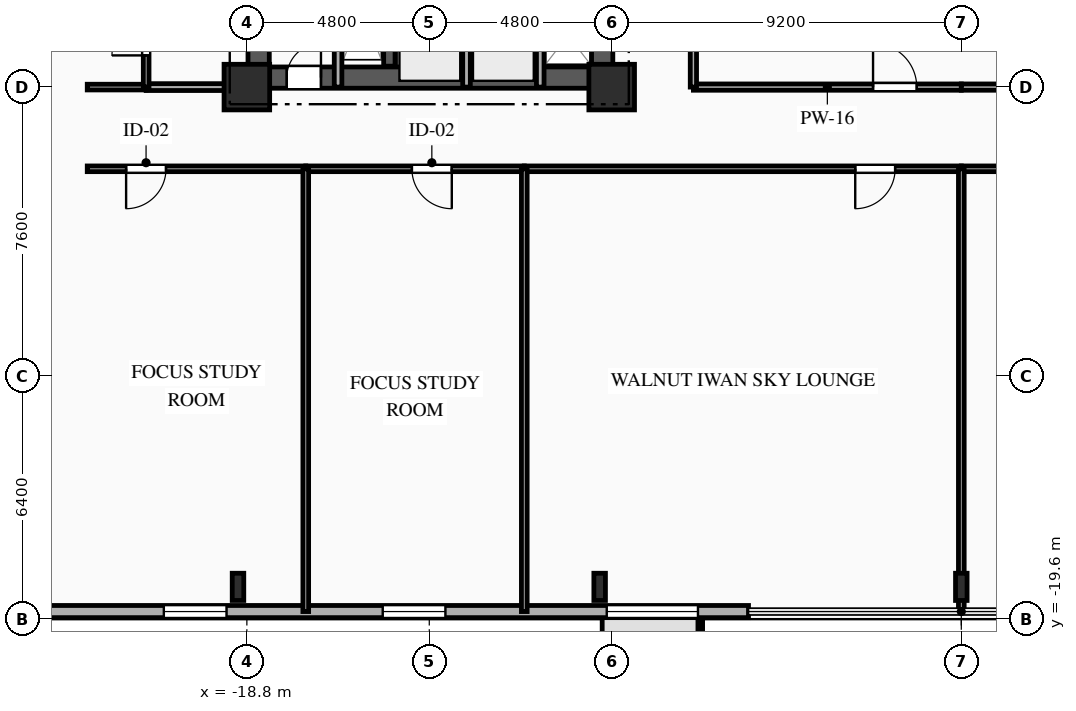
"""IFC4 building model, lengths in metres.
Left out: names, types, materials, properties, quantities, classifications, styles, units other than length and angle.
Written with IfcOpenShell. Run it as: python <this file> out.ifc"""

import sys

from ifc_helpers import new_model, si_unit, direction, frame, frame_2d, origin, origin_2d, place, context, subcontext, project, spatial, rectangle, i_section, extrude, element, fill, save


model = new_model("IFC4")
c1 = context("Model", 3, precision=1e-05, world=origin(), true_north=direction((0.0, 1.0)))
c2 = subcontext(c1, "Body", "Model", "MODEL_VIEW")
j1 = project(units=[si_unit("LENGTHUNIT", "METRE"), si_unit("PLANEANGLEUNIT", "RADIAN")], contexts=[c1])
p1 = place(None, origin())
s1 = spatial("IfcSite", under=j1, at=p1, CompositionType="ELEMENT")
p2 = place(p1, origin())
s2 = spatial("IfcBuilding", under=s1, at=p2, CompositionType="ELEMENT")
p3 = place(p2, frame((0.0, 0.0, 50.45)))
s3 = spatial("IfcBuildingStorey", under=s2, at=p3, CompositionType="ELEMENT", Elevation=50.45)
for number, where, z_axis, x_axis in (
    (1, (-18.8, -5.6, 0.0), (0.0, 0.0, 1.0), (1.0, 0.0, 0.0)),
    (2, (-9.2, -5.6, 0.0), (0.0, 0.0, 1.0), (1.0, 0.0, 0.0)),
):
    element("IfcColumn", number, at=place(p3, frame(where, z_axis=z_axis, x_axis=x_axis)), inside=s3, PredefinedType="COLUMN", context=c2, shape_type="SweptSolid", body=[
        extrude(rectangle(XDim=1.2, YDim=1.2, at=origin_2d()), origin(), (0.0, 0.0, 1.0), 3.35),
    ])
for number, where, z_axis, x_axis in (
    (3, (-19.033, -18.75, 0.0), (0.0, 0.0, 1.0), (1.0, 0.0, 0.0)),
    (4, (-9.517, -18.75, 0.0), (0.0, 0.0, 1.0), (1.0, 0.0, 0.0)),
    (5, (0.0, -18.75, 0.0), (0.0, 0.0, 1.0), (1.0, 0.0, 0.0)),
):
    element("IfcColumn", number, at=place(p3, frame(where, z_axis=z_axis, x_axis=x_axis)), inside=s3, PredefinedType="COLUMN", context=c2, shape_type="SweptSolid", body=[
        extrude(i_section(OverallWidth=0.304, OverallDepth=0.716, WebThickness=0.021, FlangeThickness=0.04, FilletRadius=0.027, at=origin_2d()), origin(), (0.0, 0.0, 1.0), 3.35),
    ])
p4 = place(p3, frame((-5.6, -19.4, 0.0), z_axis=(0.0, 0.0, 1.0), x_axis=(-1.0, 0.0, 0.0)))
e6 = element("IfcWall", 6, at=p4, inside=s3, PredefinedType="SOLIDWALL", context=c2, shape_type="SweptSolid", body=[
    extrude(rectangle(XDim=23.6, YDim=0.32, at=frame_2d((11.8, 0.0))), origin(), (0.0, 0.0, 1.0), 3.035),
])
p5 = place(p4, frame((1.33, 0.0, 0.85)))
e7 = element("IfcOpeningElement", 7, at=p5, cuts=e6, PredefinedType="OPENING", context=c2, shape_type="SweptSolid", body=[
    extrude(rectangle(XDim=2.4, YDim=1.95, at=frame_2d((1.2, 0.975))), frame((0.0, 0.17, 0.0), z_axis=(0.0, -1.0, 0.0), x_axis=(1.0, 0.0, 0.0)), (0.0, 0.0, 1.0), 0.34),
])
p6 = place(p4, frame((7.975, 0.0, 0.85)))
e8 = element("IfcOpeningElement", 8, at=p6, cuts=e6, PredefinedType="OPENING", context=c2, shape_type="SweptSolid", body=[
    extrude(rectangle(XDim=1.65, YDim=1.85, at=frame_2d((0.825, 0.925))), frame((0.0, 0.17, 0.0), z_axis=(0.0, -1.0, 0.0), x_axis=(1.0, 0.0, 0.0)), (0.0, 0.0, 1.0), 0.34),
])
p7 = place(p4, frame((13.735, 0.0, 0.85)))
e9 = element("IfcOpeningElement", 9, at=p7, cuts=e6, PredefinedType="OPENING", context=c2, shape_type="SweptSolid", body=[
    extrude(rectangle(XDim=1.65, YDim=1.85, at=frame_2d((0.825, 0.925))), frame((0.0, 0.17, 0.0), z_axis=(0.0, -1.0, 0.0), x_axis=(1.0, 0.0, 0.0)), (0.0, 0.0, 1.0), 0.34),
])
p8 = place(p3, frame((-18.8, -5.35, 0.0), z_axis=(0.0, 0.0, 1.0), x_axis=(1.0, 0.0, 0.0)))
e10 = element("IfcWall", 10, at=p8, inside=s3, PredefinedType="SHEAR", context=c2, shape_type="SweptSolid", body=[
    extrude(rectangle(XDim=9.6, YDim=0.56, at=frame_2d((4.8, 0.0))), origin(), (0.0, 0.0, 1.0), 3.035),
])
p9 = place(p8, frame((1.05, 0.0, 0.0)))
e11 = element("IfcOpeningElement", 11, at=p9, cuts=e10, PredefinedType="OPENING", context=c2, shape_type="SweptSolid", body=[
    extrude(rectangle(XDim=0.9, YDim=2.1, at=frame_2d((0.45, 1.05))), frame((0.0, 0.29, 0.0), z_axis=(0.0, -1.0, 0.0), x_axis=(1.0, 0.0, 0.0)), (0.0, 0.0, 1.0), 0.58),
])
p10 = place(p3, frame((-18.49, -5.05, 0.0), z_axis=(0.0, 0.0, 1.0), x_axis=(0.0, 1.0, 0.0)))
e12 = element("IfcWall", 12, at=p10, inside=s3, PredefinedType="SHEAR", context=c2, shape_type="SweptSolid", body=[
    extrude(rectangle(XDim=10.1, YDim=0.56, at=frame_2d((5.05, 0.0))), origin(), (0.0, 0.0, 1.0), 3.035),
])
p11 = place(p3, frame((-9.45, -5.05, 0.0), z_axis=(0.0, 0.0, 1.0), x_axis=(0.0, 1.0, 0.0)))
e13 = element("IfcWall", 13, at=p11, inside=s3, PredefinedType="SHEAR", context=c2, shape_type="SweptSolid", body=[
    extrude(rectangle(XDim=10.1, YDim=0.56, at=frame_2d((5.05, 0.0))), origin(), (0.0, 0.0, 1.0), 3.035),
])
p12 = place(p11, frame((7.15, 0.0, 0.0)))
e14 = element("IfcOpeningElement", 14, at=p12, cuts=e13, PredefinedType="OPENING", context=c2, shape_type="SweptSolid", body=[
    extrude(rectangle(XDim=0.9, YDim=2.1, at=frame_2d((0.45, 1.05))), frame((0.0, 0.29, 0.0), z_axis=(0.0, -1.0, 0.0), x_axis=(1.0, 0.0, 0.0)), (0.0, 0.0, 1.0), 0.58),
])
p13 = place(p11, frame((2.4, 0.0, 0.0)))
e15 = element("IfcOpeningElement", 15, at=p13, cuts=e13, PredefinedType="OPENING", context=c2, shape_type="SweptSolid", body=[
    extrude(rectangle(XDim=1.2, YDim=2.15, at=frame_2d((0.6, 1.075))), frame((0.0, 0.29, 0.0), z_axis=(0.0, -1.0, 0.0), x_axis=(1.0, 0.0, 0.0)), (0.0, 0.0, 1.0), 0.58),
])
p14 = place(p3, frame((-15.05, -5.05, 0.0), z_axis=(0.0, 0.0, 1.0), x_axis=(0.0, 1.0, 0.0)))
e16 = element("IfcWall", 16, at=p14, inside=s3, PredefinedType="SHEAR", context=c2, shape_type="SweptSolid", body=[
    extrude(rectangle(XDim=10.1, YDim=0.3, at=frame_2d((5.05, 0.0))), origin(), (0.0, 0.0, 1.0), 3.035),
])
p15 = place(p3, frame((-16.4, -5.6, 0.0), z_axis=(0.0, 0.0, 1.0), x_axis=(0.0, 1.0, 0.0)))
e17 = element("IfcWall", 17, at=p15, inside=s3, PredefinedType="PARTITIONING", context=c2, shape_type="SweptSolid", body=[
    extrude(rectangle(XDim=3.49, YDim=0.2, at=frame_2d((1.745, 0.0))), origin(), (0.0, 0.0, 1.0), 3.035),
])
for number, where, z_axis, x_axis in (
    (18, (-13.02, -5.6, 0.0), (0.0, 0.0, 1.0), (0.0, 1.0, 0.0)),
    (19, (-11.08, -5.6, 0.0), (0.0, 0.0, 1.0), (0.0, 1.0, 0.0)),
):
    element("IfcWall", number, at=place(p3, frame(where, z_axis=z_axis, x_axis=x_axis)), inside=s3, PredefinedType="PARTITIONING", context=c2, shape_type="SweptSolid", body=[
        extrude(rectangle(XDim=2.25, YDim=0.2, at=frame_2d((1.125, 0.0))), origin(), (0.0, 0.0, 1.0), 3.035),
    ])
p16 = place(p3, frame((-21.45, -5.6, 0.0), z_axis=(0.0, 0.0, 1.0), x_axis=(1.0, 0.0, 0.0)))
e20 = element("IfcWall", 20, at=p16, inside=s3, PredefinedType="PARTITIONING", context=c2, shape_type="SweptSolid", body=[
    extrude(rectangle(XDim=2.65, YDim=0.18, at=frame_2d((1.325, 0.0))), origin(), (0.0, 0.0, 1.0), 3.035),
])
p17 = place(p3, frame((-23.0, -5.6, 0.0), z_axis=(0.0, 0.0, 1.0), x_axis=(1.0, 0.0, 0.0)))
e21 = element("IfcWall", 21, at=p17, inside=s3, PredefinedType="PLUMBINGWALL", context=c2, shape_type="SweptSolid", body=[
    extrude(rectangle(XDim=1.55, YDim=0.15, at=frame_2d((0.775, 0.0))), origin(), (0.0, 0.0, 1.0), 3.035),
])
p18 = place(p3, frame((-17.25, -7.75, 0.0), z_axis=(0.0, 0.0, 1.0), x_axis=(-1.0, 0.0, 0.0)))
e22 = element("IfcWall", 22, at=p18, inside=s3, PredefinedType="PARTITIONING", context=c2, shape_type="SweptSolid", body=[
    extrude(rectangle(XDim=5.75, YDim=0.15, at=frame_2d((2.875, 0.0))), origin(), (0.0, 0.0, 1.0), 3.035),
])
p19 = place(p18, frame((3.677, 0.0, 0.0)))
e23 = element("IfcOpeningElement", 23, at=p19, cuts=e22, PredefinedType="OPENING", context=c2, shape_type="SweptSolid", body=[
    extrude(rectangle(XDim=1.05, YDim=2.15, at=frame_2d((0.525, 1.075))), frame((0.0, 0.085, 0.0), z_axis=(0.0, -1.0, 0.0), x_axis=(1.0, 0.0, 0.0)), (0.0, 0.0, 1.0), 0.17),
])
p20 = place(p3, frame((-11.5, -7.75, 0.0), z_axis=(0.0, 0.0, 1.0), x_axis=(-1.0, 0.0, 0.0)))
e24 = element("IfcWall", 24, at=p20, inside=s3, PredefinedType="PARTITIONING", context=c2, shape_type="SweptSolid", body=[
    extrude(rectangle(XDim=5.75, YDim=0.15, at=frame_2d((2.875, 0.0))), origin(), (0.0, 0.0, 1.0), 3.035),
])
p21 = place(p20, frame((1.907, 0.0, 0.0)))
e25 = element("IfcOpeningElement", 25, at=p21, cuts=e24, PredefinedType="OPENING", context=c2, shape_type="SweptSolid", body=[
    extrude(rectangle(XDim=1.05, YDim=2.15, at=frame_2d((0.525, 1.075))), frame((0.0, 0.085, 0.0), z_axis=(0.0, -1.0, 0.0), x_axis=(1.0, 0.0, 0.0)), (0.0, 0.0, 1.0), 0.17),
])
p22 = place(p3, frame((0.0, -7.75, 0.0), z_axis=(0.0, 0.0, 1.0), x_axis=(-1.0, 0.0, 0.0)))
e26 = element("IfcWall", 26, at=p22, inside=s3, PredefinedType="PARTITIONING", context=c2, shape_type="SweptSolid", body=[
    extrude(rectangle(XDim=11.5, YDim=0.15, at=frame_2d((5.75, 0.0))), origin(), (0.0, 0.0, 1.0), 3.035),
])
p23 = place(p22, frame((1.741, 0.0, 0.0)))
e27 = element("IfcOpeningElement", 27, at=p23, cuts=e26, PredefinedType="OPENING", context=c2, shape_type="SweptSolid", body=[
    extrude(rectangle(XDim=1.05, YDim=2.15, at=frame_2d((0.525, 1.075))), frame((0.0, 0.085, 0.0), z_axis=(0.0, -1.0, 0.0), x_axis=(1.0, 0.0, 0.0)), (0.0, 0.0, 1.0), 0.17),
])
p24 = place(p3, frame((-7.05, -5.6, 0.0), z_axis=(0.0, 0.0, 1.0), x_axis=(1.0, 0.0, 0.0)))
e28 = element("IfcWall", 28, at=p24, inside=s3, PredefinedType="PARTITIONING", context=c2, shape_type="SweptSolid", body=[
    extrude(rectangle(XDim=7.05, YDim=0.165, at=frame_2d((3.525, 0.0))), origin(), (0.0, 0.0, 1.0), 2.52),
])
p25 = place(p24, frame((4.728, 0.0, 0.0)))
e29 = element("IfcOpeningElement", 29, at=p25, cuts=e28, PredefinedType="OPENING", context=c2, shape_type="SweptSolid", body=[
    extrude(rectangle(XDim=1.15, YDim=2.15, at=frame_2d((0.575, 1.075))), frame((0.0, 0.093, 0.0), z_axis=(0.0, -1.0, 0.0), x_axis=(1.0, 0.0, 0.0)), (0.0, 0.0, 1.0), 0.185),
])
p26 = place(p3, frame((11.5, -7.75, 0.0), z_axis=(0.0, 0.0, 1.0), x_axis=(-1.0, 0.0, 0.0)))
e30 = element("IfcWall", 30, at=p26, inside=s3, PredefinedType="PARTITIONING", context=c2, shape_type="SweptSolid", body=[
    extrude(rectangle(XDim=11.5, YDim=0.15, at=frame_2d((5.75, 0.0))), origin(), (0.0, 0.0, 1.0), 3.035),
])
p27 = place(p26, frame((8.709, 0.0, 0.0)))
e31 = element("IfcOpeningElement", 31, at=p27, cuts=e30, PredefinedType="OPENING", context=c2, shape_type="SweptSolid", body=[
    extrude(rectangle(XDim=1.05, YDim=2.15, at=frame_2d((0.525, 1.075))), frame((0.0, 0.085, 0.0), z_axis=(0.0, -1.0, 0.0), x_axis=(1.0, 0.0, 0.0)), (0.0, 0.0, 1.0), 0.17),
])
p28 = place(p3, frame((0.0, -5.6, 0.0), z_axis=(0.0, 0.0, 1.0), x_axis=(1.0, 0.0, 0.0)))
e32 = element("IfcWall", 32, at=p28, inside=s3, PredefinedType="PARTITIONING", context=c2, shape_type="SweptSolid", body=[
    extrude(rectangle(XDim=7.05, YDim=0.165, at=frame_2d((3.525, 0.0))), origin(), (0.0, 0.0, 1.0), 2.52),
])
p29 = place(p3, frame((-7.05, 1.45, 0.0), z_axis=(0.0, 0.0, 1.0), x_axis=(0.0, -1.0, 0.0)))
e33 = element("IfcWall", 33, at=p29, inside=s3, PredefinedType="PARTITIONING", context=c2, shape_type="SweptSolid", body=[
    extrude(rectangle(XDim=7.05, YDim=0.165, at=frame_2d((3.525, 0.0))), origin(), (0.0, 0.0, 1.0), 3.035),
])
p30 = place(p3, frame((-21.45, -5.6, 0.0), z_axis=(0.0, 0.0, 1.0), x_axis=(0.0, 1.0, 0.0)))
e34 = element("IfcWall", 34, at=p30, inside=s3, PredefinedType="PLUMBINGWALL", context=c2, shape_type="SweptSolid", body=[
    extrude(rectangle(XDim=2.35, YDim=0.15, at=frame_2d((1.175, 0.0))), origin(), (0.0, 0.0, 1.0), 3.035),
])
p31 = place(p30, frame((0.834, 0.0, 0.0)))
e35 = element("IfcOpeningElement", 35, at=p31, cuts=e34, PredefinedType="OPENING", context=c2, shape_type="SweptSolid", body=[
    extrude(rectangle(XDim=0.9, YDim=2.1, at=frame_2d((0.45, 1.05))), frame((0.0, 0.085, 0.0), z_axis=(0.0, -1.0, 0.0), x_axis=(1.0, 0.0, 0.0)), (0.0, 0.0, 1.0), 0.17),
])
for number, where, z_axis, x_axis in (
    (36, (-17.25, -7.75, 0.0), (0.0, 0.0, 1.0), (0.0, -1.0, 0.0)),
    (37, (-11.5, -7.75, 0.0), (0.0, 0.0, 1.0), (0.0, -1.0, 0.0)),
    (38, (0.0, -7.75, 0.0), (0.0, 0.0, 1.0), (0.0, -1.0, 0.0)),
):
    element("IfcWall", number, at=place(p3, frame(where, z_axis=z_axis, x_axis=x_axis)), inside=s3, PredefinedType="PARTITIONING", context=c2, shape_type="SweptSolid", body=[
        extrude(rectangle(XDim=11.65, YDim=0.15, at=frame_2d((5.825, 0.0))), origin(), (0.0, 0.0, 1.0), 3.035),
    ])
p32 = place(p5, origin())
e39 = element("IfcWindow", 39, at=p32, inside=s3, PartitioningType="SINGLE_PANEL", PredefinedType="WINDOW", context=c2, shape_type="SweptSolid", body=[
    extrude(rectangle(XDim=2.4, YDim=1.95, at=frame_2d((1.2, 0.975))), frame((0.0, 0.03, 0.0), z_axis=(0.0, -1.0, 0.0), x_axis=(1.0, 0.0, 0.0)), (0.0, 0.0, 1.0), 0.06),
])
fill(e7, e39)
p33 = place(p6, origin())
e40 = element("IfcWindow", 40, at=p33, inside=s3, PartitioningType="SINGLE_PANEL", PredefinedType="WINDOW", context=c2, shape_type="SweptSolid", body=[
    extrude(rectangle(XDim=1.65, YDim=1.85, at=frame_2d((0.825, 0.925))), frame((0.0, 0.03, 0.0), z_axis=(0.0, -1.0, 0.0), x_axis=(1.0, 0.0, 0.0)), (0.0, 0.0, 1.0), 0.06),
])
fill(e8, e40)
p34 = place(p7, origin())
e41 = element("IfcWindow", 41, at=p34, inside=s3, PartitioningType="SINGLE_PANEL", PredefinedType="WINDOW", context=c2, shape_type="SweptSolid", body=[
    extrude(rectangle(XDim=1.65, YDim=1.85, at=frame_2d((0.825, 0.925))), frame((0.0, 0.03, 0.0), z_axis=(0.0, -1.0, 0.0), x_axis=(1.0, 0.0, 0.0)), (0.0, 0.0, 1.0), 0.06),
])
fill(e9, e41)
p35 = place(p9, origin())
e42 = element("IfcDoor", 42, at=p35, inside=s3, OperationType="SINGLE_SWING_RIGHT", PredefinedType="DOOR", context=c2, shape_type="SweptSolid", body=[
    extrude(rectangle(XDim=0.9, YDim=2.1, at=frame_2d((0.45, 1.05))), frame((0.0, 0.025, 0.0), z_axis=(0.0, -1.0, 0.0), x_axis=(1.0, 0.0, 0.0)), (0.0, 0.0, 1.0), 0.05),
])
fill(e11, e42)
p36 = place(p19, origin())
e43 = element("IfcDoor", 43, at=p36, inside=s3, OperationType="SINGLE_SWING_RIGHT", PredefinedType="DOOR", context=c2, shape_type="SweptSolid", body=[
    extrude(rectangle(XDim=1.05, YDim=2.15, at=frame_2d((0.525, 1.075))), frame((0.0, 0.025, 0.0), z_axis=(0.0, -1.0, 0.0), x_axis=(1.0, 0.0, 0.0)), (0.0, 0.0, 1.0), 0.05),
])
fill(e23, e43)
p37 = place(p21, origin())
e44 = element("IfcDoor", 44, at=p37, inside=s3, OperationType="SINGLE_SWING_LEFT", PredefinedType="DOOR", context=c2, shape_type="SweptSolid", body=[
    extrude(rectangle(XDim=1.05, YDim=2.15, at=frame_2d((0.525, 1.075))), frame((0.0, 0.025, 0.0), z_axis=(0.0, -1.0, 0.0), x_axis=(1.0, 0.0, 0.0)), (0.0, 0.0, 1.0), 0.05),
])
fill(e25, e44)
p38 = place(p23, origin())
e45 = element("IfcDoor", 45, at=p38, inside=s3, OperationType="SINGLE_SWING_RIGHT", PredefinedType="DOOR", context=c2, shape_type="SweptSolid", body=[
    extrude(rectangle(XDim=1.05, YDim=2.15, at=frame_2d((0.525, 1.075))), frame((0.0, 0.025, 0.0), z_axis=(0.0, -1.0, 0.0), x_axis=(1.0, 0.0, 0.0)), (0.0, 0.0, 1.0), 0.05),
])
fill(e27, e45)
p39 = place(p25, origin())
e46 = element("IfcDoor", 46, at=p39, inside=s3, OperationType="SINGLE_SWING_LEFT", PredefinedType="DOOR", context=c2, shape_type="SweptSolid", body=[
    extrude(rectangle(XDim=1.15, YDim=2.15, at=frame_2d((0.575, 1.075))), frame((0.0, 0.025, 0.0), z_axis=(0.0, -1.0, 0.0), x_axis=(1.0, 0.0, 0.0)), (0.0, 0.0, 1.0), 0.05),
])
fill(e29, e46)
p40 = place(p31, origin())
e47 = element("IfcDoor", 47, at=p40, inside=s3, OperationType="SINGLE_SWING_LEFT", PredefinedType="DOOR", context=c2, shape_type="SweptSolid", body=[
    extrude(rectangle(XDim=0.9, YDim=2.1, at=frame_2d((0.45, 1.05))), frame((0.0, 0.025, 0.0), z_axis=(0.0, -1.0, 0.0), x_axis=(1.0, 0.0, 0.0)), (0.0, 0.0, 1.0), 0.05),
])
fill(e35, e47)
save(model, sys.argv[1])
